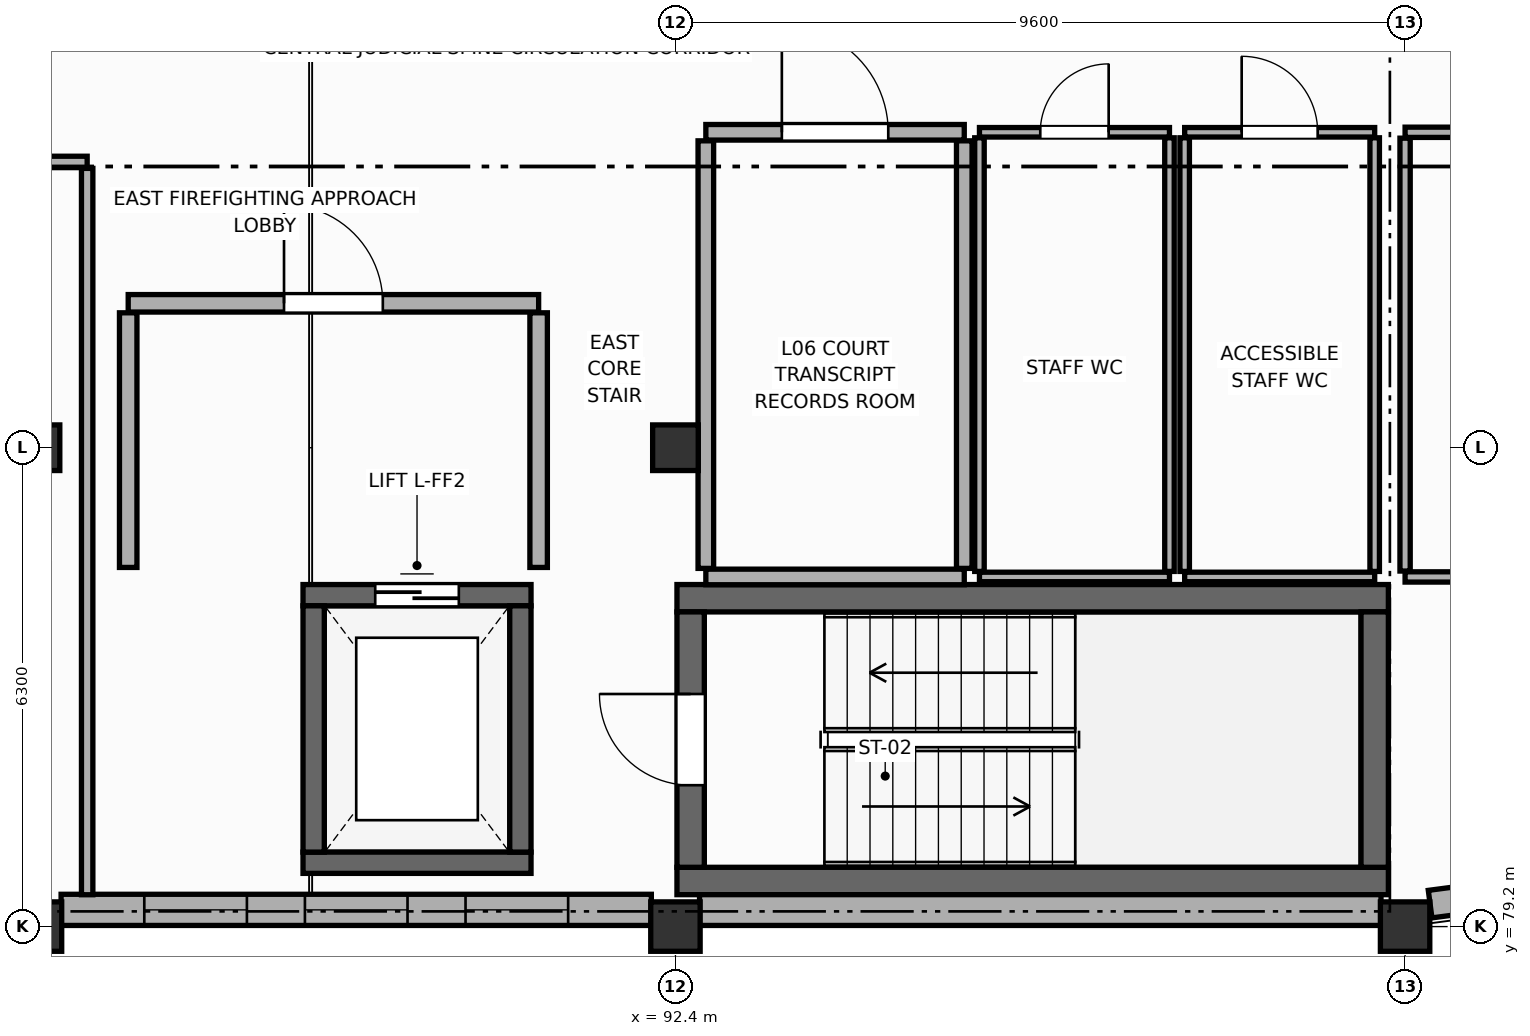
"""IFC4 building model, lengths in metres.
Left out: names, types, materials, properties, quantities, classifications, styles, units other than length and angle.
Written with IfcOpenShell. Run it as: python <this file> out.ifc"""

import sys

from ifc_helpers import new_model, si_unit, direction, frame, frame_2d, origin, origin_2d, place, context, subcontext, project, spatial, rectangle, extrude, element, fill, save


model = new_model("IFC4")
c1 = context("Model", 3, precision=1e-05, world=origin(), true_north=direction((0.0, 1.0)))
c2 = subcontext(c1, "Body", "Model", "MODEL_VIEW")
j1 = project(units=[si_unit("LENGTHUNIT", "METRE"), si_unit("PLANEANGLEUNIT", "RADIAN")], contexts=[c1])
p1 = place(None, origin())
s1 = spatial("IfcSite", under=j1, at=p1, CompositionType="ELEMENT")
p2 = place(p1, origin())
s2 = spatial("IfcBuilding", under=s1, at=p2, CompositionType="ELEMENT")
p3 = place(p2, frame((0.0, 0.0, 22.8)))
s3 = spatial("IfcBuildingStorey", under=s2, at=p3, CompositionType="ELEMENT", Elevation=22.8)
p4 = place(p3, frame((84.0, 79.2, 0.0), z_axis=(0.0, 0.0, 1.0), x_axis=(1.0, 0.0, 0.0)))
e1 = element("IfcColumn", 1, at=p4, inside=s3, PredefinedType="COLUMN", context=c2, shape_type="SweptSolid", body=[
    extrude(rectangle(XDim=0.65, YDim=0.65, at=origin_2d()), origin(), (0.0, 0.0, 1.0), 4.2),
])
p5 = place(p3, frame((84.0, 85.5, 0.0), z_axis=(0.0, 0.0, 1.0), x_axis=(1.0, 0.0, 0.0)))
e2 = element("IfcColumn", 2, at=p5, inside=s3, PredefinedType="COLUMN", context=c2, shape_type="SweptSolid", body=[
    extrude(rectangle(XDim=0.6, YDim=0.6, at=origin_2d()), origin(), (0.0, 0.0, 1.0), 4.2),
])
p6 = place(p3, frame((92.4, 79.2, 0.0), z_axis=(0.0, 0.0, 1.0), x_axis=(1.0, 0.0, 0.0)))
e3 = element("IfcColumn", 3, at=p6, inside=s3, PredefinedType="COLUMN", context=c2, shape_type="SweptSolid", body=[
    extrude(rectangle(XDim=0.65, YDim=0.65, at=origin_2d()), origin(), (0.0, 0.0, 1.0), 4.2),
])
p7 = place(p3, frame((92.4, 85.5, 0.0), z_axis=(0.0, 0.0, 1.0), x_axis=(1.0, 0.0, 0.0)))
e4 = element("IfcColumn", 4, at=p7, inside=s3, PredefinedType="COLUMN", context=c2, shape_type="SweptSolid", body=[
    extrude(rectangle(XDim=0.6, YDim=0.6, at=origin_2d()), origin(), (0.0, 0.0, 1.0), 4.2),
])
p8 = place(p3, frame((102.0, 79.2, 0.0), z_axis=(0.0, 0.0, 1.0), x_axis=(1.0, 0.0, 0.0)))
e5 = element("IfcColumn", 5, at=p8, inside=s3, PredefinedType="COLUMN", context=c2, shape_type="SweptSolid", body=[
    extrude(rectangle(XDim=0.65, YDim=0.65, at=origin_2d()), origin(), (0.0, 0.0, 1.0), 4.2),
])
p9 = place(p3, frame((92.083, 79.42, 0.0), z_axis=(0.0, 0.0, 1.0), x_axis=(-1.0, 0.0, 0.0)))
e6 = element("IfcWall", 6, at=p9, inside=s3, PredefinedType="STANDARD", context=c2, shape_type="SweptSolid", body=[
    extrude(rectangle(XDim=7.766, YDim=0.41, at=frame_2d((3.883, 0.0))), origin(), (0.0, 0.0, 1.0), 3.5),
])
p10 = place(p9, frame((1.095, 0.0, 0.85)))
e7 = element("IfcOpeningElement", 7, at=p10, cuts=e6, PredefinedType="OPENING", context=c2, shape_type="SweptSolid", body=[
    extrude(rectangle(XDim=1.35, YDim=1.95, at=frame_2d((0.675, 0.975))), frame((0.0, 0.215, 0.0), z_axis=(0.0, -1.0, 0.0), x_axis=(1.0, 0.0, 0.0)), (0.0, 0.0, 1.0), 0.43),
])
p11 = place(p9, frame((3.208, 0.0, 0.85)))
e8 = element("IfcOpeningElement", 8, at=p11, cuts=e6, PredefinedType="OPENING", context=c2, shape_type="SweptSolid", body=[
    extrude(rectangle(XDim=1.35, YDim=1.95, at=frame_2d((0.675, 0.975))), frame((0.0, 0.215, 0.0), z_axis=(0.0, -1.0, 0.0), x_axis=(1.0, 0.0, 0.0)), (0.0, 0.0, 1.0), 0.43),
])
p12 = place(p9, frame((5.321, 0.0, 0.85)))
e9 = element("IfcOpeningElement", 9, at=p12, cuts=e6, PredefinedType="OPENING", context=c2, shape_type="SweptSolid", body=[
    extrude(rectangle(XDim=1.35, YDim=1.95, at=frame_2d((0.675, 0.975))), frame((0.0, 0.215, 0.0), z_axis=(0.0, -1.0, 0.0), x_axis=(1.0, 0.0, 0.0)), (0.0, 0.0, 1.0), 0.43),
])
p13 = place(p3, frame((101.683, 79.42, 0.0), z_axis=(0.0, 0.0, 1.0), x_axis=(-1.0, 0.0, 0.0)))
e10 = element("IfcWall", 10, at=p13, inside=s3, PredefinedType="STANDARD", context=c2, shape_type="SweptSolid", body=[
    extrude(rectangle(XDim=8.966, YDim=0.41, at=frame_2d((4.483, 0.0))), origin(), (0.0, 0.0, 1.0), 3.1),
])
p14 = place(p3, frame((102.329, 79.496, 0.0), z_axis=(0.0, 0.0, 1.0), x_axis=(0.99144889538, 0.13049554724, 0.0)))
e11 = element("IfcWall", 11, at=p14, inside=s3, PredefinedType="ELEMENTEDWALL", context=c2, shape_type="SweptSolid", body=[
    extrude(rectangle(XDim=2.924, YDim=0.365, at=frame_2d((1.462, 0.0))), origin(), (0.0, 0.0, 1.0), 3.1),
])
p15 = place(p14, frame((1.062, 0.0, 0.85)))
e12 = element("IfcOpeningElement", 12, at=p15, cuts=e11, PredefinedType="OPENING", context=c2, shape_type="SweptSolid", body=[
    extrude(rectangle(XDim=0.8, YDim=1.7, at=frame_2d((0.4, 0.85))), frame((0.0, 0.192, 0.0), z_axis=(0.0, -1.0, 0.0), x_axis=(1.0, 0.0, 0.0)), (0.0, 0.0, 1.0), 0.385),
])
for number, where, z_axis, x_axis in (
    (13, (92.42, 83.52, 0.0), (0.0, 0.0, 1.0), (1.0, 0.0, 0.0)),
    (14, (101.78, 79.8, 0.0), (0.0, 0.0, 1.0), (-1.0, 0.0, 0.0)),
):
    element("IfcWall", number, at=place(p3, frame(where, z_axis=z_axis, x_axis=x_axis)), inside=s3, PredefinedType="SHEAR", context=c2, shape_type="SweptSolid", body=[
        extrude(rectangle(XDim=9.36, YDim=0.36, at=frame_2d((4.68, 0.0))), origin(), (0.0, 0.0, 1.0), 3.97),
    ])
p16 = place(p3, frame((92.6, 79.98, 0.0), z_axis=(0.0, 0.0, 1.0), x_axis=(0.0, 1.0, 0.0)))
e15 = element("IfcWall", 15, at=p16, inside=s3, PredefinedType="SHEAR", context=c2, shape_type="SweptSolid", body=[
    extrude(rectangle(XDim=3.36, YDim=0.36, at=frame_2d((1.68, 0.0))), origin(), (0.0, 0.0, 1.0), 3.97),
])
p17 = place(p16, frame((1.08, 0.0, 0.0)))
e16 = element("IfcOpeningElement", 16, at=p17, cuts=e15, PredefinedType="OPENING", context=c2, shape_type="SweptSolid", body=[
    extrude(rectangle(XDim=1.2, YDim=2.2, at=frame_2d((0.6, 1.1))), frame((0.0, 0.19, 0.0), z_axis=(0.0, -1.0, 0.0), x_axis=(1.0, 0.0, 0.0)), (0.0, 0.0, 1.0), 0.38),
])
p18 = place(p3, frame((101.6, 83.34, 0.0), z_axis=(0.0, 0.0, 1.0), x_axis=(0.0, -1.0, 0.0)))
e17 = element("IfcWall", 17, at=p18, inside=s3, PredefinedType="SHEAR", context=c2, shape_type="SweptSolid", body=[
    extrude(rectangle(XDim=3.36, YDim=0.36, at=frame_2d((1.68, 0.0))), origin(), (0.0, 0.0, 1.0), 3.97),
])
p19 = place(p3, frame((87.5, 83.56, 0.0), z_axis=(0.0, 0.0, 1.0), x_axis=(1.0, 0.0, 0.0)))
e18 = element("IfcWall", 18, at=p19, inside=s3, PredefinedType="SHEAR", context=c2, shape_type="SweptSolid", body=[
    extrude(rectangle(XDim=3.0, YDim=0.28, at=frame_2d((1.5, 0.0))), origin(), (0.0, 0.0, 1.0), 3.97),
])
p20 = place(p19, frame((0.95, 0.0, 0.0)))
e19 = element("IfcOpeningElement", 19, at=p20, cuts=e18, PredefinedType="OPENING", context=c2, shape_type="SweptSolid", body=[
    extrude(rectangle(XDim=1.1, YDim=2.2, at=frame_2d((0.55, 1.1))), frame((0.0, 0.15, 0.0), z_axis=(0.0, -1.0, 0.0), x_axis=(1.0, 0.0, 0.0)), (0.0, 0.0, 1.0), 0.3),
])
p21 = place(p3, frame((90.5, 80.04, 0.0), z_axis=(0.0, 0.0, 1.0), x_axis=(-1.0, 0.0, 0.0)))
e20 = element("IfcWall", 20, at=p21, inside=s3, PredefinedType="SHEAR", context=c2, shape_type="SweptSolid", body=[
    extrude(rectangle(XDim=3.0, YDim=0.28, at=frame_2d((1.5, 0.0))), origin(), (0.0, 0.0, 1.0), 3.97),
])
for number, where, z_axis, x_axis in (
    (21, (87.64, 80.18, 0.0), (0.0, 0.0, 1.0), (0.0, 1.0, 0.0)),
    (22, (90.36, 83.42, 0.0), (0.0, 0.0, 1.0), (0.0, -1.0, 0.0)),
):
    element("IfcWall", number, at=place(p3, frame(where, z_axis=z_axis, x_axis=x_axis)), inside=s3, PredefinedType="SHEAR", context=c2, shape_type="SweptSolid", body=[
        extrude(rectangle(XDim=3.24, YDim=0.28, at=frame_2d((1.62, 0.0))), origin(), (0.0, 0.0, 1.0), 3.97),
    ])
p22 = place(p3, frame((85.2, 87.4, 0.0), z_axis=(0.0, 0.0, 1.0), x_axis=(1.0, 0.0, 0.0)))
e23 = element("IfcWall", 23, at=p22, inside=s3, PredefinedType="STANDARD", context=c2, shape_type="SweptSolid", body=[
    extrude(rectangle(XDim=5.4, YDim=0.23, at=frame_2d((2.7, 0.0))), origin(), (0.0, 0.0, 1.0), 3.955),
])
p23 = place(p22, frame((2.05, 0.0, 0.0)))
e24 = element("IfcOpeningElement", 24, at=p23, cuts=e23, PredefinedType="OPENING", context=c2, shape_type="SweptSolid", body=[
    extrude(rectangle(XDim=1.3, YDim=2.2, at=frame_2d((0.65, 1.1))), frame((0.0, 0.125, 0.0), z_axis=(0.0, -1.0, 0.0), x_axis=(1.0, 0.0, 0.0)), (0.0, 0.0, 1.0), 0.25),
])
for number, where, z_axis, x_axis in (
    (25, (85.2, 83.925, 0.0), (0.0, 0.0, 1.0), (0.0, 1.0, 0.0)),
    (26, (90.6, 87.275, 0.0), (0.0, 0.0, 1.0), (0.0, -1.0, 0.0)),
):
    element("IfcWall", number, at=place(p3, frame(where, z_axis=z_axis, x_axis=x_axis)), inside=s3, PredefinedType="STANDARD", context=c2, shape_type="SweptSolid", body=[
        extrude(rectangle(XDim=3.35, YDim=0.23, at=frame_2d((1.675, 0.0))), origin(), (0.0, 0.0, 1.0), 3.4),
    ])
p24 = place(p3, frame((96.4, 89.65, 0.0), z_axis=(0.0, 0.0, 1.0), x_axis=(1.0, 0.0, 0.0)))
e27 = element("IfcWall", 27, at=p24, inside=s3, PredefinedType="PARTITIONING", context=c2, shape_type="SweptSolid", body=[
    extrude(rectangle(XDim=2.5, YDim=0.125, at=frame_2d((1.25, 0.0))), origin(), (0.0, 0.0, 1.0), 3.955),
])
p25 = place(p24, frame((0.8, 0.0, 0.0)))
e28 = element("IfcOpeningElement", 28, at=p25, cuts=e27, PredefinedType="OPENING", context=c2, shape_type="SweptSolid", body=[
    extrude(rectangle(XDim=0.9, YDim=2.1, at=frame_2d((0.45, 1.05))), frame((0.0, 0.073, 0.0), z_axis=(0.0, -1.0, 0.0), x_axis=(1.0, 0.0, 0.0)), (0.0, 0.0, 1.0), 0.145),
])
p26 = place(p3, frame((98.9, 83.8, 0.0), z_axis=(0.0, 0.0, 1.0), x_axis=(-1.0, 0.0, 0.0)))
e29 = element("IfcWall", 29, at=p26, inside=s3, PredefinedType="PARTITIONING", context=c2, shape_type="SweptSolid", body=[
    extrude(rectangle(XDim=2.5, YDim=0.125, at=frame_2d((1.25, 0.0))), origin(), (0.0, 0.0, 1.0), 3.955),
])
for number, where, z_axis, x_axis in (
    (30, (96.4, 83.873, 0.0), (0.0, 0.0, 1.0), (0.0, 1.0, 0.0)),
    (31, (98.9, 89.577, 0.0), (0.0, 0.0, 1.0), (0.0, -1.0, 0.0)),
):
    element("IfcWall", number, at=place(p3, frame(where, z_axis=z_axis, x_axis=x_axis)), inside=s3, PredefinedType="PARTITIONING", context=c2, shape_type="SweptSolid", body=[
        extrude(rectangle(XDim=5.705, YDim=0.125, at=frame_2d((2.853, 0.0))), origin(), (0.0, 0.0, 1.0), 3.955),
    ])
p27 = place(p3, frame((99.1, 89.65, 0.0), z_axis=(0.0, 0.0, 1.0), x_axis=(1.0, 0.0, 0.0)))
e32 = element("IfcWall", 32, at=p27, inside=s3, PredefinedType="PARTITIONING", context=c2, shape_type="SweptSolid", body=[
    extrude(rectangle(XDim=2.5, YDim=0.125, at=frame_2d((1.25, 0.0))), origin(), (0.0, 0.0, 1.0), 3.1),
])
p28 = place(p27, frame((0.75, 0.0, 0.0)))
e33 = element("IfcOpeningElement", 33, at=p28, cuts=e32, PredefinedType="OPENING", context=c2, shape_type="SweptSolid", body=[
    extrude(rectangle(XDim=1.0, YDim=2.1, at=frame_2d((0.5, 1.05))), frame((0.0, 0.073, 0.0), z_axis=(0.0, -1.0, 0.0), x_axis=(1.0, 0.0, 0.0)), (0.0, 0.0, 1.0), 0.145),
])
p29 = place(p3, frame((101.6, 83.8, 0.0), z_axis=(0.0, 0.0, 1.0), x_axis=(-1.0, 0.0, 0.0)))
e34 = element("IfcWall", 34, at=p29, inside=s3, PredefinedType="PARTITIONING", context=c2, shape_type="SweptSolid", body=[
    extrude(rectangle(XDim=2.5, YDim=0.125, at=frame_2d((1.25, 0.0))), origin(), (0.0, 0.0, 1.0), 3.1),
])
p30 = place(p3, frame((99.1, 83.873, 0.0), z_axis=(0.0, 0.0, 1.0), x_axis=(0.0, 1.0, 0.0)))
e35 = element("IfcWall", 35, at=p30, inside=s3, PredefinedType="PARTITIONING", context=c2, shape_type="SweptSolid", body=[
    extrude(rectangle(XDim=5.705, YDim=0.125, at=frame_2d((2.853, 0.0))), origin(), (0.0, 0.0, 1.0), 3.955),
])
p31 = place(p3, frame((101.6, 89.577, 0.0), z_axis=(0.0, 0.0, 1.0), x_axis=(0.0, -1.0, 0.0)))
e36 = element("IfcWall", 36, at=p31, inside=s3, PredefinedType="PARTITIONING", context=c2, shape_type="SweptSolid", body=[
    extrude(rectangle(XDim=5.705, YDim=0.125, at=frame_2d((2.853, 0.0))), origin(), (0.0, 0.0, 1.0), 3.1),
])
p32 = place(p3, frame((92.8, 89.65, 0.0), z_axis=(0.0, 0.0, 1.0), x_axis=(1.0, 0.0, 0.0)))
e37 = element("IfcWall", 37, at=p32, inside=s3, PredefinedType="STANDARD", context=c2, shape_type="SweptSolid", body=[
    extrude(rectangle(XDim=3.4, YDim=0.205, at=frame_2d((1.7, 0.0))), origin(), (0.0, 0.0, 1.0), 3.955),
])
p33 = place(p32, frame((1.0, 0.0, 0.0)))
e38 = element("IfcOpeningElement", 38, at=p33, cuts=e37, PredefinedType="OPENING", context=c2, shape_type="SweptSolid", body=[
    extrude(rectangle(XDim=1.4, YDim=2.25, at=frame_2d((0.7, 1.125))), frame((0.0, 0.113, 0.0), z_axis=(0.0, -1.0, 0.0), x_axis=(1.0, 0.0, 0.0)), (0.0, 0.0, 1.0), 0.225),
])
p34 = place(p3, frame((96.2, 83.8, 0.0), z_axis=(0.0, 0.0, 1.0), x_axis=(-1.0, 0.0, 0.0)))
e39 = element("IfcWall", 39, at=p34, inside=s3, PredefinedType="STANDARD", context=c2, shape_type="SweptSolid", body=[
    extrude(rectangle(XDim=3.4, YDim=0.205, at=frame_2d((1.7, 0.0))), origin(), (0.0, 0.0, 1.0), 3.955),
])
for number, where, z_axis, x_axis in (
    (40, (92.8, 83.913, 0.0), (0.0, 0.0, 1.0), (0.0, 1.0, 0.0)),
    (41, (96.2, 89.538, 0.0), (0.0, 0.0, 1.0), (0.0, -1.0, 0.0)),
):
    element("IfcWall", number, at=place(p3, frame(where, z_axis=z_axis, x_axis=x_axis)), inside=s3, PredefinedType="STANDARD", context=c2, shape_type="SweptSolid", body=[
        extrude(rectangle(XDim=5.625, YDim=0.205, at=frame_2d((2.812, 0.0))), origin(), (0.0, 0.0, 1.0), 3.955),
    ])
p35 = place(p3, frame((82.181, 89.26, 0.0), z_axis=(0.0, 0.0, 1.0), x_axis=(1.0, 0.0, 0.0)))
e42 = element("IfcWall", 42, at=p35, inside=s3, PredefinedType="PARTITIONING", context=c2, shape_type="SweptSolid", body=[
    extrude(rectangle(XDim=2.479, YDim=0.15, at=frame_2d((1.24, 0.0))), origin(), (0.0, 0.0, 1.0), 3.5),
])
p36 = place(p35, frame((0.49, 0.0, 0.0)))
e43 = element("IfcOpeningElement", 43, at=p36, cuts=e42, PredefinedType="OPENING", context=c2, shape_type="SweptSolid", body=[
    extrude(rectangle(XDim=1.5, YDim=2.35, at=frame_2d((0.75, 1.175))), frame((0.0, 0.085, 0.0), z_axis=(0.0, -1.0, 0.0), x_axis=(1.0, 0.0, 0.0)), (0.0, 0.0, 1.0), 0.17),
])
p37 = place(p3, frame((84.66, 89.175, 0.0), z_axis=(0.0, 0.0, 1.0), x_axis=(0.0, -1.0, 0.0)))
e44 = element("IfcWall", 44, at=p37, inside=s3, PredefinedType="PARTITIONING", context=c2, shape_type="SweptSolid", body=[
    extrude(rectangle(XDim=9.556, YDim=0.15, at=frame_2d((4.778, 0.0))), origin(), (0.0, 0.0, 1.0), 3.4),
])
p38 = place(p3, frame((102.0, 89.65, 0.0), z_axis=(0.0, 0.0, 1.0), x_axis=(1.0, 0.0, 0.0)))
e45 = element("IfcWall", 45, at=p38, inside=s3, PredefinedType="PARTITIONING", context=c2, shape_type="SweptSolid", body=[
    extrude(rectangle(XDim=9.5, YDim=0.135, at=frame_2d((4.75, 0.0))), origin(), (0.0, 0.0, 1.0), 3.0),
])
p39 = place(p38, frame((1.92, 0.0, 0.0)))
e46 = element("IfcOpeningElement", 46, at=p39, cuts=e45, PredefinedType="OPENING", context=c2, shape_type="SweptSolid", body=[
    extrude(rectangle(XDim=0.95, YDim=2.15, at=frame_2d((0.475, 1.075))), frame((0.0, 0.077, 0.0), z_axis=(0.0, -1.0, 0.0), x_axis=(1.0, 0.0, 0.0)), (0.0, 0.0, 1.0), 0.155),
])
p40 = place(p3, frame((111.5, 83.8, 0.0), z_axis=(0.0, 0.0, 1.0), x_axis=(-1.0, 0.0, 0.0)))
e47 = element("IfcWall", 47, at=p40, inside=s3, PredefinedType="PARTITIONING", context=c2, shape_type="SweptSolid", body=[
    extrude(rectangle(XDim=9.5, YDim=0.135, at=frame_2d((4.75, 0.0))), origin(), (0.0, 0.0, 1.0), 3.0),
])
p41 = place(p3, frame((102.0, 83.877, 0.0), z_axis=(0.0, 0.0, 1.0), x_axis=(0.0, 1.0, 0.0)))
e48 = element("IfcWall", 48, at=p41, inside=s3, PredefinedType="PARTITIONING", context=c2, shape_type="SweptSolid", body=[
    extrude(rectangle(XDim=5.695, YDim=0.135, at=frame_2d((2.848, 0.0))), origin(), (0.0, 0.0, 1.0), 3.1),
])
p42 = place(p10, origin())
e49 = element("IfcWindow", 49, at=p42, inside=s3, PartitioningType="SINGLE_PANEL", PredefinedType="WINDOW", context=c2, shape_type="SweptSolid", body=[
    extrude(rectangle(XDim=1.35, YDim=1.95, at=frame_2d((0.675, 0.975))), frame((0.0, 0.03, 0.0), z_axis=(0.0, -1.0, 0.0), x_axis=(1.0, 0.0, 0.0)), (0.0, 0.0, 1.0), 0.06),
])
fill(e7, e49)
p43 = place(p11, origin())
e50 = element("IfcWindow", 50, at=p43, inside=s3, PartitioningType="SINGLE_PANEL", PredefinedType="WINDOW", context=c2, shape_type="SweptSolid", body=[
    extrude(rectangle(XDim=1.35, YDim=1.95, at=frame_2d((0.675, 0.975))), frame((0.0, 0.03, 0.0), z_axis=(0.0, -1.0, 0.0), x_axis=(1.0, 0.0, 0.0)), (0.0, 0.0, 1.0), 0.06),
])
fill(e8, e50)
p44 = place(p12, origin())
e51 = element("IfcWindow", 51, at=p44, inside=s3, PartitioningType="SINGLE_PANEL", PredefinedType="WINDOW", context=c2, shape_type="SweptSolid", body=[
    extrude(rectangle(XDim=1.35, YDim=1.95, at=frame_2d((0.675, 0.975))), frame((0.0, 0.03, 0.0), z_axis=(0.0, -1.0, 0.0), x_axis=(1.0, 0.0, 0.0)), (0.0, 0.0, 1.0), 0.06),
])
fill(e9, e51)
p45 = place(p17, origin())
e52 = element("IfcDoor", 52, at=p45, inside=s3, OperationType="SINGLE_SWING_RIGHT", PredefinedType="DOOR", context=c2, shape_type="SweptSolid", body=[
    extrude(rectangle(XDim=1.2, YDim=2.2, at=frame_2d((0.6, 1.1))), frame((0.0, 0.025, 0.0), z_axis=(0.0, -1.0, 0.0), x_axis=(1.0, 0.0, 0.0)), (0.0, 0.0, 1.0), 0.05),
])
fill(e16, e52)
p46 = place(p20, origin())
e53 = element("IfcDoor", 53, at=p46, inside=s3, OperationType="DOUBLE_DOOR_SLIDING", PredefinedType="DOOR", context=c2, shape_type="SweptSolid", body=[
    extrude(rectangle(XDim=1.1, YDim=2.2, at=frame_2d((0.55, 1.1))), frame((0.0, 0.025, 0.0), z_axis=(0.0, -1.0, 0.0), x_axis=(1.0, 0.0, 0.0)), (0.0, 0.0, 1.0), 0.05),
])
fill(e19, e53)
p47 = place(p23, origin())
e54 = element("IfcDoor", 54, at=p47, inside=s3, OperationType="SINGLE_SWING_LEFT", PredefinedType="DOOR", context=c2, shape_type="SweptSolid", body=[
    extrude(rectangle(XDim=1.3, YDim=2.2, at=frame_2d((0.65, 1.1))), frame((0.0, 0.025, 0.0), z_axis=(0.0, -1.0, 0.0), x_axis=(1.0, 0.0, 0.0)), (0.0, 0.0, 1.0), 0.05),
])
fill(e24, e54)
p48 = place(p25, origin())
e55 = element("IfcDoor", 55, at=p48, inside=s3, OperationType="SINGLE_SWING_RIGHT", PredefinedType="DOOR", context=c2, shape_type="SweptSolid", body=[
    extrude(rectangle(XDim=0.9, YDim=2.1, at=frame_2d((0.45, 1.05))), frame((0.0, 0.025, 0.0), z_axis=(0.0, -1.0, 0.0), x_axis=(1.0, 0.0, 0.0)), (0.0, 0.0, 1.0), 0.05),
])
fill(e28, e55)
p49 = place(p28, origin())
e56 = element("IfcDoor", 56, at=p49, inside=s3, OperationType="SINGLE_SWING_LEFT", PredefinedType="DOOR", context=c2, shape_type="SweptSolid", body=[
    extrude(rectangle(XDim=1.0, YDim=2.1, at=frame_2d((0.5, 1.05))), frame((0.0, 0.025, 0.0), z_axis=(0.0, -1.0, 0.0), x_axis=(1.0, 0.0, 0.0)), (0.0, 0.0, 1.0), 0.05),
])
fill(e33, e56)
p50 = place(p33, origin())
e57 = element("IfcDoor", 57, at=p50, inside=s3, OperationType="SINGLE_SWING_LEFT", PredefinedType="DOOR", context=c2, shape_type="SweptSolid", body=[
    extrude(rectangle(XDim=1.4, YDim=2.25, at=frame_2d((0.7, 1.125))), frame((0.0, 0.025, 0.0), z_axis=(0.0, -1.0, 0.0), x_axis=(1.0, 0.0, 0.0)), (0.0, 0.0, 1.0), 0.05),
])
fill(e38, e57)
save(model, sys.argv[1])
